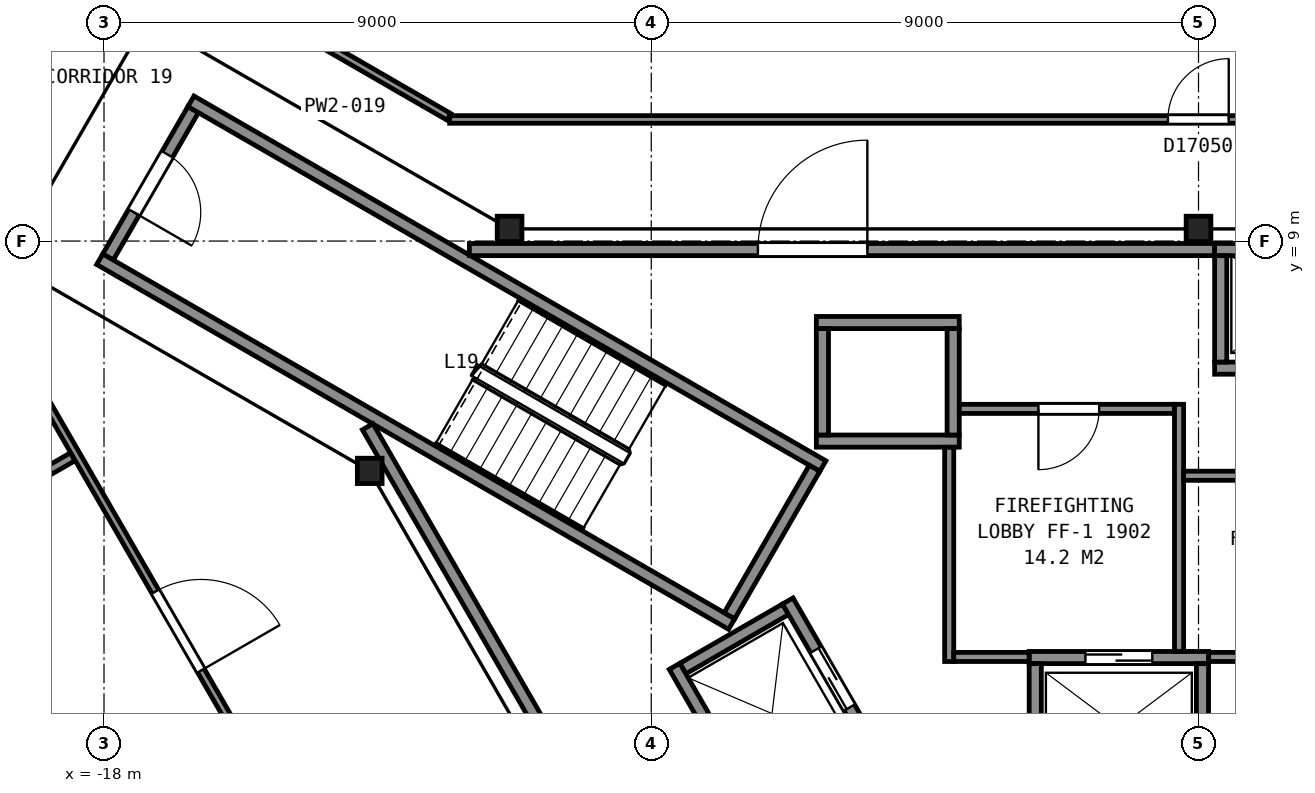
"""IFC4 building model, lengths in metres.
Left out: names, types, materials, properties, quantities, classifications, styles, units other than length and angle.
Written with IfcOpenShell. Run it as: python <this file> out.ifc"""

import sys

from ifc_helpers import new_model, si_unit, direction, frame, frame_2d, origin, origin_2d, place, context, subcontext, project, spatial, rectangle, i_section, extrude, element, fill, save


model = new_model("IFC4")
c1 = context("Model", 3, precision=1e-05, world=origin(), true_north=direction((0.0, 1.0)))
c2 = subcontext(c1, "Body", "Model", "MODEL_VIEW")
j1 = project(units=[si_unit("LENGTHUNIT", "METRE"), si_unit("PLANEANGLEUNIT", "RADIAN")], contexts=[c1])
p1 = place(None, origin())
s1 = spatial("IfcSite", under=j1, at=p1, CompositionType="ELEMENT")
p2 = place(p1, origin())
s2 = spatial("IfcBuilding", under=s1, at=p2, CompositionType="ELEMENT")
p3 = place(p2, frame((0.0, 0.0, 83.6)))
s3 = spatial("IfcBuildingStorey", under=s2, at=p3, CompositionType="ELEMENT", Elevation=83.6)
for number, where, z_axis, x_axis in (
    (1, (0.0, 9.2, 0.0), (0.0, 0.0, 1.0), (1.0, 0.0, 0.0)),
    (2, (-11.33, 9.2, 0.0), (0.0, 0.0, 1.0), (1.0, 0.0, 0.0)),
    (3, (-13.63, 5.22, 0.0), (0.0, 0.0, 1.0), (1.0, 0.0, 0.0)),
):
    element("IfcColumn", number, at=place(p3, frame(where, z_axis=z_axis, x_axis=x_axis)), inside=s3, PredefinedType="COLUMN", context=c2, shape_type="SweptSolid", body=[
        extrude(i_section(OverallWidth=0.406, OverallDepth=0.417, WebThickness=0.03, FlangeThickness=0.048, FilletRadius=0.015, at=origin_2d()), origin(), (0.0, 0.0, 1.0), 3.6),
    ])
p4 = place(p3, frame((-16.534, 11.162, 0.0), z_axis=(0.0, 0.0, 1.0), x_axis=(-0.49998411664, -0.866034573852, 0.0)))
e4 = element("IfcWall", 4, at=p4, inside=s3, PredefinedType="PARTITIONING", context=c2, shape_type="SweptSolid", body=[
    extrude(rectangle(XDim=2.8, YDim=0.2, at=frame_2d((1.4, 0.0))), origin(), (0.0, 0.0, 1.0), 3.35),
])
p5 = place(p4, frame((0.85, 0.0, 0.0)))
e5 = element("IfcOpeningElement", 5, at=p5, cuts=e4, PredefinedType="OPENING", context=c2, shape_type="SweptSolid", body=[
    extrude(rectangle(XDim=1.1, YDim=2.1, at=frame_2d((0.55, 1.05))), frame((0.0, 0.11, 0.0), z_axis=(0.0, -1.0, 0.0), x_axis=(1.0, 0.0, 0.0)), (0.0, 0.0, 1.0), 0.22),
])
for number, where, z_axis, x_axis in (
    (6, (-7.678, 2.701, 0.0), (0.0, 0.0, 1.0), (-0.866, 0.5, 0.0)),
    (7, (-6.178, 5.299, 0.0), (0.0, 0.0, 1.0), (-0.866, 0.5, 0.0)),
):
    element("IfcWall", number, at=place(p3, frame(where, z_axis=z_axis, x_axis=x_axis)), inside=s3, PredefinedType="PARTITIONING", context=c2, shape_type="SweptSolid", body=[
        extrude(rectangle(XDim=12.0, YDim=0.2, at=frame_2d((6.0, 0.0))), origin(), (0.0, 0.0, 1.0), 3.35),
    ])
p6 = place(p3, frame((-6.315, 5.262, 0.0), z_axis=(0.0, 0.0, 1.0), x_axis=(-0.500049511043, -0.865996816683, 0.0)))
e8 = element("IfcWall", 8, at=p6, inside=s3, PredefinedType="PARTITIONING", context=c2, shape_type="SweptSolid", body=[
    extrude(rectangle(XDim=2.8, YDim=0.2, at=frame_2d((1.4, 0.0))), origin(), (0.0, 0.0, 1.0), 3.35),
])
p7 = place(p3, frame((-2.785, 2.15, 0.0), z_axis=(0.0, 0.0, 1.0), x_axis=(1.0, 0.0, 0.0)))
e9 = element("IfcWall", 9, at=p7, inside=s3, PredefinedType="PARTITIONING", context=c2, shape_type="SweptSolid", body=[
    extrude(rectangle(XDim=2.95, YDim=0.2, at=frame_2d((1.475, 0.0))), origin(), (0.0, 0.0, 1.0), 3.6),
])
p8 = place(p7, frame((0.925, 0.0, 0.0)))
e10 = element("IfcOpeningElement", 10, at=p8, cuts=e9, PredefinedType="OPENING", context=c2, shape_type="SweptSolid", body=[
    extrude(rectangle(XDim=1.1, YDim=2.1, at=frame_2d((0.55, 1.05))), frame((0.0, 0.11, 0.0), z_axis=(0.0, -1.0, 0.0), x_axis=(1.0, 0.0, 0.0)), (0.0, 0.0, 1.0), 0.22),
])
p9 = place(p3, frame((-6.285, 5.71, 0.0), z_axis=(0.0, 0.0, 1.0), x_axis=(1.0, 0.0, 0.0)))
e11 = element("IfcWall", 11, at=p9, inside=s3, PredefinedType="PARTITIONING", context=c2, shape_type="SweptSolid", body=[
    extrude(rectangle(XDim=2.35, YDim=0.2, at=frame_2d((1.175, 0.0))), origin(), (0.0, 0.0, 1.0), 3.6),
])
p10 = place(p3, frame((0.265, 6.91, 0.0), z_axis=(0.0, 0.0, 1.0), x_axis=(1.0, 0.0, 0.0)))
e12 = element("IfcWall", 12, at=p10, inside=s3, PredefinedType="PARTITIONING", context=c2, shape_type="SweptSolid", body=[
    extrude(rectangle(XDim=2.55, YDim=0.2, at=frame_2d((1.275, 0.0))), origin(), (0.0, 0.0, 1.0), 3.6),
])
p11 = place(p10, frame((0.725, 0.0, 0.0)))
e13 = element("IfcOpeningElement", 13, at=p11, cuts=e12, PredefinedType="OPENING", context=c2, shape_type="SweptSolid", body=[
    extrude(rectangle(XDim=1.1, YDim=2.1, at=frame_2d((0.55, 1.05))), frame((0.0, 0.11, 0.0), z_axis=(0.0, -1.0, 0.0), x_axis=(1.0, 0.0, 0.0)), (0.0, 0.0, 1.0), 0.22),
])
p12 = place(p3, frame((-6.285, 7.66, 0.0), z_axis=(0.0, 0.0, 1.0), x_axis=(1.0, 0.0, 0.0)))
e14 = element("IfcWall", 14, at=p12, inside=s3, PredefinedType="PARTITIONING", context=c2, shape_type="SweptSolid", body=[
    extrude(rectangle(XDim=2.35, YDim=0.2, at=frame_2d((1.175, 0.0))), origin(), (0.0, 0.0, 1.0), 3.6),
])
p13 = place(p3, frame((0.265, 8.86, 0.0), z_axis=(0.0, 0.0, 1.0), x_axis=(1.0, 0.0, 0.0)))
e15 = element("IfcWall", 15, at=p13, inside=s3, PredefinedType="PARTITIONING", context=c2, shape_type="SweptSolid", body=[
    extrude(rectangle(XDim=2.55, YDim=0.2, at=frame_2d((1.275, 0.0))), origin(), (0.0, 0.0, 1.0), 3.6),
])
p14 = place(p3, frame((-8.48, 1.969, 0.0), z_axis=(0.0, 0.0, 1.0), x_axis=(0.866000020948, 0.500043961785, 0.0)))
e16 = element("IfcWall", 16, at=p14, inside=s3, PredefinedType="PARTITIONING", context=c2, shape_type="SweptSolid", body=[
    extrude(rectangle(XDim=1.95, YDim=0.2, at=frame_2d((0.975, 0.0))), origin(), (0.0, 0.0, 1.0), 3.6),
])
p15 = place(p3, frame((0.365, 7.01, 0.0), z_axis=(0.0, 0.0, 1.0), x_axis=(0.0, 1.0, 0.0)))
e17 = element("IfcWall", 17, at=p15, inside=s3, PredefinedType="PARTITIONING", context=c2, shape_type="SweptSolid", body=[
    extrude(rectangle(XDim=1.75, YDim=0.2, at=frame_2d((0.875, 0.0))), origin(), (0.0, 0.0, 1.0), 3.6),
])
for number, where, z_axis, x_axis in (
    (18, (0.065, 0.1, 0.0), (0.0, 0.0, 1.0), (0.0, 1.0, 0.0)),
    (19, (-2.685, 0.1, 0.0), (0.0, 0.0, 1.0), (0.0, 1.0, 0.0)),
):
    element("IfcWall", number, at=place(p3, frame(where, z_axis=z_axis, x_axis=x_axis)), inside=s3, PredefinedType="PARTITIONING", context=c2, shape_type="SweptSolid", body=[
        extrude(rectangle(XDim=1.95, YDim=0.2, at=frame_2d((0.975, 0.0))), origin(), (0.0, 0.0, 1.0), 3.6),
    ])
for number, where, z_axis, x_axis in (
    (20, (-4.035, 5.81, 0.0), (0.0, 0.0, 1.0), (0.0, 1.0, 0.0)),
    (21, (-6.185, 5.81, 0.0), (0.0, 0.0, 1.0), (0.0, 1.0, 0.0)),
):
    element("IfcWall", number, at=place(p3, frame(where, z_axis=z_axis, x_axis=x_axis)), inside=s3, PredefinedType="PARTITIONING", context=c2, shape_type="SweptSolid", body=[
        extrude(rectangle(XDim=1.75, YDim=0.2, at=frame_2d((0.875, 0.0))), origin(), (0.0, 0.0, 1.0), 3.6),
    ])
p16 = place(p3, frame((-5.28, 0.525, 0.0), z_axis=(0.0, 0.0, 1.0), x_axis=(-0.500037662692, 0.866003658127, 0.0)))
e22 = element("IfcWall", 22, at=p16, inside=s3, PredefinedType="PARTITIONING", context=c2, shape_type="SweptSolid", body=[
    extrude(rectangle(XDim=2.95, YDim=0.2, at=frame_2d((1.475, 0.0))), origin(), (0.0, 0.0, 1.0), 3.6),
])
p17 = place(p16, frame((0.925, 0.0, 0.0)))
e23 = element("IfcOpeningElement", 23, at=p17, cuts=e22, PredefinedType="OPENING", context=c2, shape_type="SweptSolid", body=[
    extrude(rectangle(XDim=1.1, YDim=2.1, at=frame_2d((0.55, 1.05))), frame((0.0, 0.11, 0.0), z_axis=(0.0, -1.0, 0.0), x_axis=(1.0, 0.0, 0.0)), (0.0, 0.0, 1.0), 0.22),
])
p18 = place(p3, frame((-7.242, -0.376, 0.0), z_axis=(0.0, 0.0, 1.0), x_axis=(-0.499996545922, 0.866027397988, 0.0)))
e24 = element("IfcWall", 24, at=p18, inside=s3, PredefinedType="PARTITIONING", context=c2, shape_type="SweptSolid", body=[
    extrude(rectangle(XDim=2.75, YDim=0.2, at=frame_2d((1.375, 0.0))), origin(), (0.0, 0.0, 1.0), 3.6),
])
p19 = place(p3, frame((-13.664, 5.946, 0.0), z_axis=(0.0, 0.0, 1.0), x_axis=(0.499994327219, -0.866028678941, 0.0)))
e25 = element("IfcWall", 25, at=p19, inside=s3, PredefinedType="PARTITIONING", context=c2, shape_type="SweptSolid", body=[
    extrude(rectangle(XDim=23.968, YDim=0.2, at=frame_2d((11.984, 0.0))), origin(), (0.0, 0.0, 1.0), 3.35),
])
p20 = place(p3, frame((0.263, 8.86, 0.0), z_axis=(0.0, 0.0, 1.0), x_axis=(-1.0, 0.0, 0.0)))
e26 = element("IfcWall", 26, at=p20, inside=s3, PredefinedType="PARTITIONING", context=c2, shape_type="SweptSolid", body=[
    extrude(rectangle(XDim=12.254, YDim=0.2, at=frame_2d((6.127, 0.0))), origin(), (0.0, 0.0, 1.0), 3.35),
])
p21 = place(p20, frame((5.709, 0.0, 0.0)))
e27 = element("IfcOpeningElement", 27, at=p21, cuts=e26, PredefinedType="OPENING", context=c2, shape_type="SweptSolid", body=[
    extrude(rectangle(XDim=1.8, YDim=2.1, at=frame_2d((0.9, 1.05))), frame((0.0, 0.11, 0.0), z_axis=(0.0, -1.0, 0.0), x_axis=(1.0, 0.0, 0.0)), (0.0, 0.0, 1.0), 0.22),
])
p22 = place(p3, frame((-4.1, 2.085, 0.0), z_axis=(0.0, 0.0, 1.0), x_axis=(0.0, 1.0, 0.0)))
e28 = element("IfcWall", 28, at=p22, inside=s3, PredefinedType="PARTITIONING", context=c2, shape_type="SweptSolid", body=[
    extrude(rectangle(XDim=3.523, YDim=0.15, at=frame_2d((1.761, 0.0))), origin(), (0.0, 0.0, 1.0), 3.35),
])
p23 = place(p3, frame((-4.025, 2.16, 0.0), z_axis=(0.0, 0.0, 1.0), x_axis=(1.0, 0.0, 0.0)))
e29 = element("IfcWall", 29, at=p23, inside=s3, PredefinedType="PARTITIONING", context=c2, shape_type="SweptSolid", body=[
    extrude(rectangle(XDim=1.238, YDim=0.15, at=frame_2d((0.619, 0.0))), origin(), (0.0, 0.0, 1.0), 3.35),
])
p24 = place(p3, frame((-3.933, 6.24, 0.0), z_axis=(0.0, 0.0, 1.0), x_axis=(1.0, 0.0, 0.0)))
e30 = element("IfcWall", 30, at=p24, inside=s3, PredefinedType="PARTITIONING", context=c2, shape_type="SweptSolid", body=[
    extrude(rectangle(XDim=3.538, YDim=0.15, at=frame_2d((1.769, 0.0))), origin(), (0.0, 0.0, 1.0), 3.35),
])
p25 = place(p24, frame((1.3, 0.0, 0.0)))
e31 = element("IfcOpeningElement", 31, at=p25, cuts=e30, PredefinedType="OPENING", context=c2, shape_type="SweptSolid", body=[
    extrude(rectangle(XDim=1.0, YDim=2.1, at=frame_2d((0.5, 1.05))), frame((0.0, 0.085, 0.0), z_axis=(0.0, -1.0, 0.0), x_axis=(1.0, 0.0, 0.0)), (0.0, 0.0, 1.0), 0.17),
])
p26 = place(p3, frame((-0.32, 2.252, 0.0), z_axis=(0.0, 0.0, 1.0), x_axis=(0.0, 1.0, 0.0)))
e32 = element("IfcWall", 32, at=p26, inside=s3, PredefinedType="PARTITIONING", context=c2, shape_type="SweptSolid", body=[
    extrude(rectangle(XDim=4.063, YDim=0.15, at=frame_2d((2.031, 0.0))), origin(), (0.0, 0.0, 1.0), 3.35),
])
p27 = place(p3, frame((-0.245, 5.14, 0.0), z_axis=(0.0, 0.0, 1.0), x_axis=(1.0, 0.0, 0.0)))
e33 = element("IfcWall", 33, at=p27, inside=s3, PredefinedType="PARTITIONING", context=c2, shape_type="SweptSolid", body=[
    extrude(rectangle(XDim=5.11, YDim=0.15, at=frame_2d((2.555, 0.0))), origin(), (0.0, 0.0, 1.0), 3.35),
])
p28 = place(p27, frame((1.975, 0.0, 0.0)))
e34 = element("IfcOpeningElement", 34, at=p28, cuts=e33, PredefinedType="OPENING", context=c2, shape_type="SweptSolid", body=[
    extrude(rectangle(XDim=1.0, YDim=2.1, at=frame_2d((0.5, 1.05))), frame((0.0, 0.085, 0.0), z_axis=(0.0, -1.0, 0.0), x_axis=(1.0, 0.0, 0.0)), (0.0, 0.0, 1.0), 0.17),
])
p29 = place(p3, frame((0.167, 2.16, 0.0), z_axis=(0.0, 0.0, 1.0), x_axis=(1.0, 0.0, 0.0)))
e35 = element("IfcWall", 35, at=p29, inside=s3, PredefinedType="PARTITIONING", context=c2, shape_type="SweptSolid", body=[
    extrude(rectangle(XDim=1.356, YDim=0.15, at=frame_2d((0.678, 0.0))), origin(), (0.0, 0.0, 1.0), 3.35),
])
p30 = place(p3, frame((-25.432, 1.459, 0.0), z_axis=(0.0, 0.0, 1.0), x_axis=(0.866052736899, 0.499952654668, 0.0)))
e36 = element("IfcWall", 36, at=p30, inside=s3, PredefinedType="PARTITIONING", context=c2, shape_type="SweptSolid", body=[
    extrude(rectangle(XDim=7.987, YDim=0.15, at=frame_2d((3.994, 0.0))), origin(), (0.0, 0.0, 1.0), 2.262),
])
p31 = place(p3, frame((-3.766, -19.958, 0.0), z_axis=(0.0, 0.0, 1.0), x_axis=(-0.50002170027, 0.866012874765, 0.0)))
e37 = element("IfcWall", 37, at=p31, inside=s3, PredefinedType="PARTITIONING", context=c2, shape_type="SweptSolid", body=[
    extrude(rectangle(XDim=31.379, YDim=0.125, at=frame_2d((15.69, 0.0))), origin(), (0.0, 0.0, 1.0), 2.262),
])
p32 = place(p31, frame((25.28, 0.0, 0.0)))
e38 = element("IfcOpeningElement", 38, at=p32, cuts=e37, PredefinedType="OPENING", context=c2, shape_type="SweptSolid", body=[
    extrude(rectangle(XDim=1.5, YDim=2.1, at=frame_2d((0.75, 1.05))), frame((0.0, 0.073, 0.0), z_axis=(0.0, -1.0, 0.0), x_axis=(1.0, 0.0, 0.0)), (0.0, 0.0, 1.0), 0.145),
])
p33 = place(p31, frame((21.124, 0.0, 0.0)))
e39 = element("IfcOpeningElement", 39, at=p33, cuts=e37, PredefinedType="OPENING", context=c2, shape_type="SweptSolid", body=[
    extrude(rectangle(XDim=0.9, YDim=2.1, at=frame_2d((0.45, 1.05))), frame((0.0, 0.073, 0.0), z_axis=(0.0, -1.0, 0.0), x_axis=(1.0, 0.0, 0.0)), (0.0, 0.0, 1.0), 0.145),
])
p34 = place(p31, frame((14.349, 0.0, 0.0)))
e40 = element("IfcOpeningElement", 40, at=p34, cuts=e37, PredefinedType="OPENING", context=c2, shape_type="SweptSolid", body=[
    extrude(rectangle(XDim=0.9, YDim=2.1, at=frame_2d((0.45, 1.05))), frame((0.0, 0.073, 0.0), z_axis=(0.0, -1.0, 0.0), x_axis=(1.0, 0.0, 0.0)), (0.0, 0.0, 1.0), 0.145),
])
p35 = place(p31, frame((11.804, 0.0, 0.0)))
e41 = element("IfcOpeningElement", 41, at=p35, cuts=e37, PredefinedType="OPENING", context=c2, shape_type="SweptSolid", body=[
    extrude(rectangle(XDim=0.9, YDim=2.1, at=frame_2d((0.45, 1.05))), frame((0.0, 0.073, 0.0), z_axis=(0.0, -1.0, 0.0), x_axis=(1.0, 0.0, 0.0)), (0.0, 0.0, 1.0), 0.145),
])
p36 = place(p31, frame((5.33, 0.0, 0.0)))
e42 = element("IfcOpeningElement", 42, at=p36, cuts=e37, PredefinedType="OPENING", context=c2, shape_type="SweptSolid", body=[
    extrude(rectangle(XDim=0.9, YDim=2.1, at=frame_2d((0.45, 1.05))), frame((0.0, 0.073, 0.0), z_axis=(0.0, -1.0, 0.0), x_axis=(1.0, 0.0, 0.0)), (0.0, 0.0, 1.0), 0.145),
])
p37 = place(p31, frame((2.906, 0.0, 0.0)))
e43 = element("IfcOpeningElement", 43, at=p37, cuts=e37, PredefinedType="OPENING", context=c2, shape_type="SweptSolid", body=[
    extrude(rectangle(XDim=1.0, YDim=2.1, at=frame_2d((0.5, 1.05))), frame((0.0, 0.073, 0.0), z_axis=(0.0, -1.0, 0.0), x_axis=(1.0, 0.0, 0.0)), (0.0, 0.0, 1.0), 0.145),
])
p38 = place(p3, frame((-14.37, 12.222, 0.0), z_axis=(0.0, 0.0, 1.0), x_axis=(0.866063239147, -0.499934461503, 0.0)))
e44 = element("IfcWall", 44, at=p38, inside=s3, PredefinedType="PARTITIONING", context=c2, shape_type="SweptSolid", body=[
    extrude(rectangle(XDim=2.359, YDim=0.125, at=frame_2d((1.18, 0.0))), origin(), (0.0, 0.0, 1.0), 2.262),
])
p39 = place(p3, frame((-12.315, 11.0, 0.0), z_axis=(0.0, 0.0, 1.0), x_axis=(1.0, 0.0, 0.0)))
e45 = element("IfcWall", 45, at=p39, inside=s3, PredefinedType="PARTITIONING", context=c2, shape_type="SweptSolid", body=[
    extrude(rectangle(XDim=24.631, YDim=0.125, at=frame_2d((12.315, 0.0))), origin(), (0.0, 0.0, 1.0), 2.262),
])
p40 = place(p39, frame((11.812, 0.0, 0.0)))
e46 = element("IfcOpeningElement", 46, at=p40, cuts=e45, PredefinedType="OPENING", context=c2, shape_type="SweptSolid", body=[
    extrude(rectangle(XDim=1.0, YDim=2.1, at=frame_2d((0.5, 1.05))), frame((0.0, 0.073, 0.0), z_axis=(0.0, -1.0, 0.0), x_axis=(1.0, 0.0, 0.0)), (0.0, 0.0, 1.0), 0.145),
])
p41 = place(p5, origin())
e47 = element("IfcDoor", 47, at=p41, inside=s3, OperationType="SINGLE_SWING_RIGHT", PredefinedType="DOOR", context=c2, shape_type="SweptSolid", body=[
    extrude(rectangle(XDim=1.1, YDim=2.1, at=frame_2d((0.55, 1.05))), frame((0.0, 0.025, 0.0), z_axis=(0.0, -1.0, 0.0), x_axis=(1.0, 0.0, 0.0)), (0.0, 0.0, 1.0), 0.05),
])
fill(e5, e47)
p42 = place(p8, origin())
e48 = element("IfcDoor", 48, at=p42, inside=s3, OperationType="SLIDING_TO_LEFT", PredefinedType="DOOR", context=c2, shape_type="SweptSolid", body=[
    extrude(rectangle(XDim=1.1, YDim=2.1, at=frame_2d((0.55, 1.05))), frame((0.0, 0.025, 0.0), z_axis=(0.0, -1.0, 0.0), x_axis=(1.0, 0.0, 0.0)), (0.0, 0.0, 1.0), 0.05),
])
fill(e10, e48)
p43 = place(p17, origin())
e49 = element("IfcDoor", 49, at=p43, inside=s3, OperationType="SLIDING_TO_LEFT", PredefinedType="DOOR", context=c2, shape_type="SweptSolid", body=[
    extrude(rectangle(XDim=1.1, YDim=2.1, at=frame_2d((0.55, 1.05))), frame((0.0, 0.025, 0.0), z_axis=(0.0, -1.0, 0.0), x_axis=(1.0, 0.0, 0.0)), (0.0, 0.0, 1.0), 0.05),
])
fill(e23, e49)
p44 = place(p21, origin())
e50 = element("IfcDoor", 50, at=p44, inside=s3, OperationType="DOUBLE_DOOR_SINGLE_SWING", PredefinedType="DOOR", context=c2, shape_type="SweptSolid", body=[
    extrude(rectangle(XDim=1.8, YDim=2.1, at=frame_2d((0.9, 1.05))), frame((0.0, 0.025, 0.0), z_axis=(0.0, -1.0, 0.0), x_axis=(1.0, 0.0, 0.0)), (0.0, 0.0, 1.0), 0.05),
])
fill(e27, e50)
p45 = place(p25, origin())
e51 = element("IfcDoor", 51, at=p45, inside=s3, OperationType="SINGLE_SWING_LEFT", PredefinedType="DOOR", context=c2, shape_type="SweptSolid", body=[
    extrude(rectangle(XDim=1.0, YDim=2.1, at=frame_2d((0.5, 1.05))), frame((0.0, 0.025, 0.0), z_axis=(0.0, -1.0, 0.0), x_axis=(1.0, 0.0, 0.0)), (0.0, 0.0, 1.0), 0.05),
])
fill(e31, e51)
p46 = place(p32, origin())
e52 = element("IfcDoor", 52, at=p46, inside=s3, OperationType="DOUBLE_DOOR_SINGLE_SWING", PredefinedType="DOOR", context=c2, shape_type="SweptSolid", body=[
    extrude(rectangle(XDim=1.5, YDim=2.1, at=frame_2d((0.75, 1.05))), frame((0.0, 0.025, 0.0), z_axis=(0.0, -1.0, 0.0), x_axis=(1.0, 0.0, 0.0)), (0.0, 0.0, 1.0), 0.05),
])
fill(e38, e52)
p47 = place(p40, origin())
e53 = element("IfcDoor", 53, at=p47, inside=s3, OperationType="SINGLE_SWING_RIGHT", PredefinedType="DOOR", context=c2, shape_type="SweptSolid", body=[
    extrude(rectangle(XDim=1.0, YDim=2.1, at=frame_2d((0.5, 1.05))), frame((0.0, 0.025, 0.0), z_axis=(0.0, -1.0, 0.0), x_axis=(1.0, 0.0, 0.0)), (0.0, 0.0, 1.0), 0.05),
])
fill(e46, e53)
save(model, sys.argv[1])
